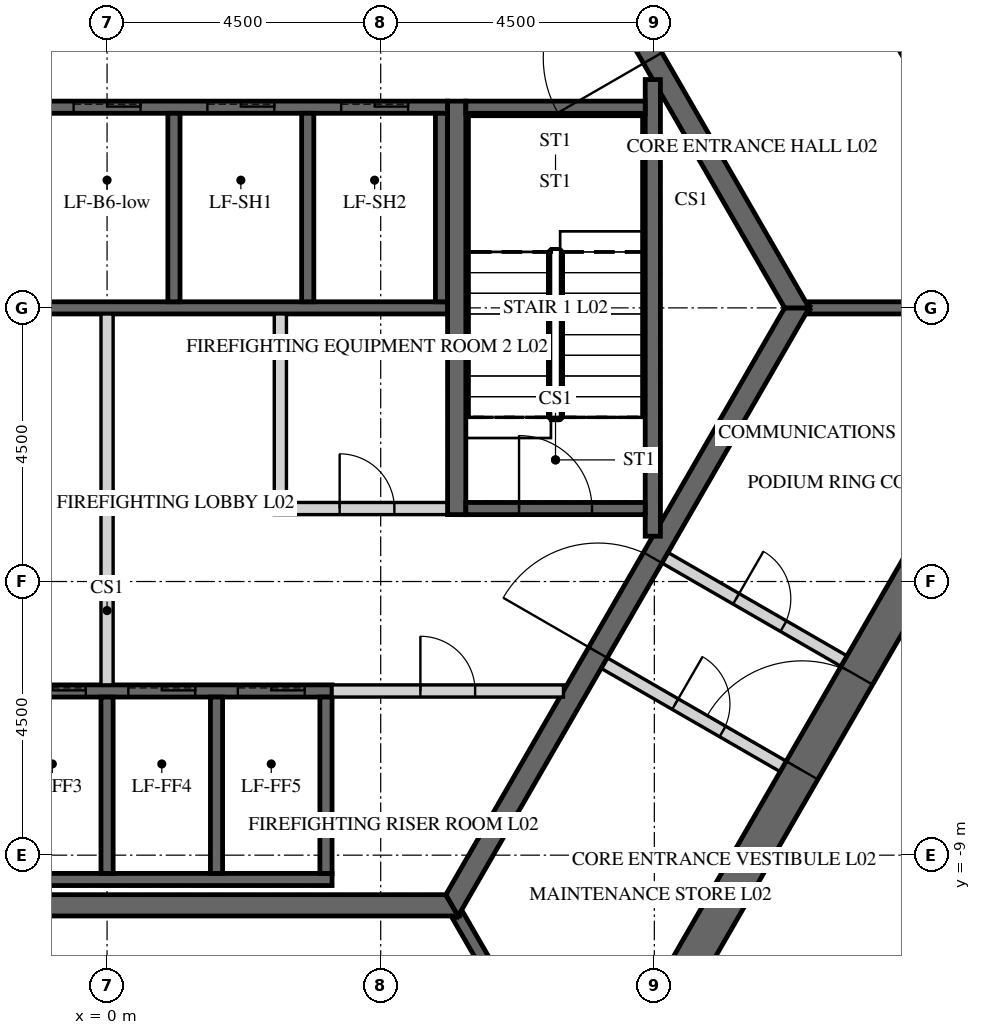
"""IFC4 building model, lengths in metres.
Left out: names, types, materials, properties, quantities, classifications, styles, units other than length and angle.
Written with IfcOpenShell. Run it as: python <this file> out.ifc"""

import sys

from ifc_helpers import new_model, si_unit, direction, frame, frame_2d, origin, place, context, subcontext, project, spatial, polyline, rectangle, outline, extrude, element, fill, save


model = new_model("IFC4")
c1 = context("Model", 3, precision=1e-05, world=origin(), true_north=direction((0.0, 1.0)))
c2 = subcontext(c1, "Body", "Model", "MODEL_VIEW")
j1 = project(units=[si_unit("LENGTHUNIT", "METRE"), si_unit("PLANEANGLEUNIT", "RADIAN")], contexts=[c1])
p1 = place(None, origin())
s1 = spatial("IfcSite", under=j1, at=p1, CompositionType="ELEMENT")
p2 = place(p1, origin())
s2 = spatial("IfcBuilding", under=s1, at=p2, CompositionType="ELEMENT")
p3 = place(p2, frame((0.0, 0.0, 15.0)))
s3 = spatial("IfcBuildingStorey", under=s2, at=p3, CompositionType="ELEMENT", Elevation=15.0)
p4 = place(p3, frame((7.91, -13.7, -0.25), z_axis=(0.0, 0.0, 1.0), x_axis=(0.499999880136, 0.866025472988, 0.0)))
e1 = element("IfcWall", 1, at=p4, inside=s3, PredefinedType="SHEAR", context=c2, shape_type="SweptSolid", body=[
    extrude(outline(polyline([(-0.173, -0.3), (15.993, -0.3), (15.646, 0.3), (0.173, 0.3), (-0.173, -0.3)])), origin(), (0.0, 0.0, 1.0), 5.5),
])
p5 = place(p4, frame((7.039, 0.0, 0.25)))
e2 = element("IfcOpeningElement", 2, at=p5, cuts=e1, PredefinedType="OPENING", context=c2, shape_type="SweptSolid", body=[
    extrude(rectangle(XDim=1.8, YDim=2.4, at=frame_2d((0.9, 1.2))), frame((0.0, 0.31, 0.0), z_axis=(0.0, -1.0, 0.0), x_axis=(1.0, 0.0, 0.0)), (0.0, 0.0, 1.0), 0.62),
])
p6 = place(p3, frame((15.819, 0.0, -0.25), z_axis=(0.0, 0.0, 1.0), x_axis=(-0.499999880136, 0.866025472988, 0.0)))
e3 = element("IfcWall", 3, at=p6, inside=s3, PredefinedType="SHEAR", context=c2, shape_type="SweptSolid", body=[
    extrude(outline(polyline([(-0.173, -0.3), (15.993, -0.3), (15.646, 0.3), (0.173, 0.3), (-0.173, -0.3)])), origin(), (0.0, 0.0, 1.0), 5.5),
])
p7 = place(p6, frame((6.981, 0.0, 0.25)))
e4 = element("IfcOpeningElement", 4, at=p7, cuts=e3, PredefinedType="OPENING", context=c2, shape_type="SweptSolid", body=[
    extrude(rectangle(XDim=1.8, YDim=2.4, at=frame_2d((0.9, 1.2))), frame((0.0, 0.31, 0.0), z_axis=(0.0, -1.0, 0.0), x_axis=(1.0, 0.0, 0.0)), (0.0, 0.0, 1.0), 0.62),
])
p8 = place(p3, frame((-5.673, -9.825, -0.25), z_axis=(0.0, 0.0, 1.0), x_axis=(1.0, 0.0, 0.0)))
e5 = element("IfcWall", 5, at=p8, inside=s3, PredefinedType="SHEAR", context=c2, shape_type="SweptSolid", body=[
    extrude(outline(polyline([(-0.101, -0.175), (11.446, -0.175), (11.244, 0.175), (0.101, 0.175), (-0.101, -0.175)])), origin(), (0.0, 0.0, 1.0), 5.5),
])
p9 = place(p3, frame((5.673, -9.825, -0.25), z_axis=(0.0, 0.0, 1.0), x_axis=(0.499995046907, 0.866028263435, 0.0)))
e6 = element("IfcWall", 6, at=p9, inside=s3, PredefinedType="SHEAR", context=c2, shape_type="SweptSolid", body=[
    extrude(outline(polyline([(-0.101, -0.175), (11.446, -0.175), (11.244, 0.175), (0.101, 0.175), (-0.101, -0.175)])), origin(), (0.0, 0.0, 1.0), 5.5),
])
p10 = place(p9, frame((4.801, 0.0, 0.25)))
e7 = element("IfcOpeningElement", 7, at=p10, cuts=e6, PredefinedType="OPENING", context=c2, shape_type="SweptSolid", body=[
    extrude(rectangle(XDim=1.8, YDim=2.4, at=frame_2d((0.9, 1.2))), frame((0.0, 0.185, 0.0), z_axis=(0.0, -1.0, 0.0), x_axis=(1.0, 0.0, 0.0)), (0.0, 0.0, 1.0), 0.37),
])
p11 = place(p3, frame((11.345, 0.0, -0.25), z_axis=(0.0, 0.0, 1.0), x_axis=(-0.499995046907, 0.866028263435, 0.0)))
e8 = element("IfcWall", 8, at=p11, inside=s3, PredefinedType="SHEAR", context=c2, shape_type="SweptSolid", body=[
    extrude(outline(polyline([(-0.101, -0.175), (11.446, -0.175), (11.244, 0.175), (0.101, 0.175), (-0.101, -0.175)])), origin(), (0.0, 0.0, 1.0), 5.5),
])
p12 = place(p11, frame((4.744, 0.0, 0.25)))
e9 = element("IfcOpeningElement", 9, at=p12, cuts=e8, PredefinedType="OPENING", context=c2, shape_type="SweptSolid", body=[
    extrude(rectangle(XDim=1.8, YDim=2.4, at=frame_2d((0.9, 1.2))), frame((0.0, 0.185, 0.0), z_axis=(0.0, -1.0, 0.0), x_axis=(1.0, 0.0, 0.0)), (0.0, 0.0, 1.0), 0.37),
])
p13 = place(p3, frame((-5.6, 3.3, -0.25), z_axis=(0.0, 0.0, 1.0), x_axis=(1.0, 0.0, 0.0)))
e10 = element("IfcWall", 10, at=p13, inside=s3, PredefinedType="SHEAR", context=c2, shape_type="SweptSolid", body=[
    extrude(rectangle(XDim=11.2, YDim=0.2, at=frame_2d((5.6, 0.0))), origin(), (0.0, 0.0, 1.0), 5.5),
])
p14 = place(p13, frame((0.65, 0.0, 0.25)))
e11 = element("IfcOpeningElement", 11, at=p14, cuts=e10, PredefinedType="OPENING", context=c2, shape_type="SweptSolid", body=[
    extrude(rectangle(XDim=1.1, YDim=2.1, at=frame_2d((0.55, 1.05))), frame((0.0, 0.11, 0.0), z_axis=(0.0, -1.0, 0.0), x_axis=(1.0, 0.0, 0.0)), (0.0, 0.0, 1.0), 0.22),
])
p15 = place(p13, frame((2.85, 0.0, 0.25)))
e12 = element("IfcOpeningElement", 12, at=p15, cuts=e10, PredefinedType="OPENING", context=c2, shape_type="SweptSolid", body=[
    extrude(rectangle(XDim=1.1, YDim=2.1, at=frame_2d((0.55, 1.05))), frame((0.0, 0.11, 0.0), z_axis=(0.0, -1.0, 0.0), x_axis=(1.0, 0.0, 0.0)), (0.0, 0.0, 1.0), 0.22),
])
p16 = place(p13, frame((5.05, 0.0, 0.25)))
e13 = element("IfcOpeningElement", 13, at=p16, cuts=e10, PredefinedType="OPENING", context=c2, shape_type="SweptSolid", body=[
    extrude(rectangle(XDim=1.1, YDim=2.1, at=frame_2d((0.55, 1.05))), frame((0.0, 0.11, 0.0), z_axis=(0.0, -1.0, 0.0), x_axis=(1.0, 0.0, 0.0)), (0.0, 0.0, 1.0), 0.22),
])
p17 = place(p13, frame((7.25, 0.0, 0.25)))
e14 = element("IfcOpeningElement", 14, at=p17, cuts=e10, PredefinedType="OPENING", context=c2, shape_type="SweptSolid", body=[
    extrude(rectangle(XDim=1.1, YDim=2.1, at=frame_2d((0.55, 1.05))), frame((0.0, 0.11, 0.0), z_axis=(0.0, -1.0, 0.0), x_axis=(1.0, 0.0, 0.0)), (0.0, 0.0, 1.0), 0.22),
])
p18 = place(p13, frame((9.45, 0.0, 0.25)))
e15 = element("IfcOpeningElement", 15, at=p18, cuts=e10, PredefinedType="OPENING", context=c2, shape_type="SweptSolid", body=[
    extrude(rectangle(XDim=1.1, YDim=2.1, at=frame_2d((0.55, 1.05))), frame((0.0, 0.11, 0.0), z_axis=(0.0, -1.0, 0.0), x_axis=(1.0, 0.0, 0.0)), (0.0, 0.0, 1.0), 0.22),
])
p19 = place(p3, frame((-5.6, 0.0, -0.25), z_axis=(0.0, 0.0, 1.0), x_axis=(1.0, 0.0, 0.0)))
e16 = element("IfcWall", 16, at=p19, inside=s3, PredefinedType="SHEAR", context=c2, shape_type="SweptSolid", body=[
    extrude(rectangle(XDim=11.2, YDim=0.2, at=frame_2d((5.6, 0.0))), origin(), (0.0, 0.0, 1.0), 5.5),
])
for number, where, z_axis, x_axis in (
    (17, (1.1, 0.1, -0.25), (0.0, 0.0, 1.0), (0.0, 1.0, 0.0)),
    (18, (3.3, 0.1, -0.25), (0.0, 0.0, 1.0), (0.0, 1.0, 0.0)),
    (19, (5.5, 0.1, -0.25), (0.0, 0.0, 1.0), (0.0, 1.0, 0.0)),
):
    element("IfcWall", number, at=place(p3, frame(where, z_axis=z_axis, x_axis=x_axis)), inside=s3, PredefinedType="SHEAR", context=c2, shape_type="SweptSolid", body=[
        extrude(rectangle(XDim=3.1, YDim=0.2, at=frame_2d((1.55, 0.0))), origin(), (0.0, 0.0, 1.0), 5.5),
    ])
p20 = place(p3, frame((-5.5, -6.3, -0.25), z_axis=(0.0, 0.0, 1.0), x_axis=(1.0, 0.0, 0.0)))
e20 = element("IfcWall", 20, at=p20, inside=s3, PredefinedType="SHEAR", context=c2, shape_type="SweptSolid", body=[
    extrude(rectangle(XDim=9.2, YDim=0.2, at=frame_2d((4.6, 0.0))), origin(), (0.0, 0.0, 1.0), 5.5),
])
p21 = place(p20, frame((0.45, 0.0, 0.25)))
e21 = element("IfcOpeningElement", 21, at=p21, cuts=e20, PredefinedType="OPENING", context=c2, shape_type="SweptSolid", body=[
    extrude(rectangle(XDim=1.1, YDim=2.1, at=frame_2d((0.55, 1.05))), frame((0.0, 0.11, 0.0), z_axis=(0.0, -1.0, 0.0), x_axis=(1.0, 0.0, 0.0)), (0.0, 0.0, 1.0), 0.22),
])
p22 = place(p20, frame((2.25, 0.0, 0.25)))
e22 = element("IfcOpeningElement", 22, at=p22, cuts=e20, PredefinedType="OPENING", context=c2, shape_type="SweptSolid", body=[
    extrude(rectangle(XDim=1.1, YDim=2.1, at=frame_2d((0.55, 1.05))), frame((0.0, 0.11, 0.0), z_axis=(0.0, -1.0, 0.0), x_axis=(1.0, 0.0, 0.0)), (0.0, 0.0, 1.0), 0.22),
])
p23 = place(p20, frame((4.05, 0.0, 0.25)))
e23 = element("IfcOpeningElement", 23, at=p23, cuts=e20, PredefinedType="OPENING", context=c2, shape_type="SweptSolid", body=[
    extrude(rectangle(XDim=1.1, YDim=2.1, at=frame_2d((0.55, 1.05))), frame((0.0, 0.11, 0.0), z_axis=(0.0, -1.0, 0.0), x_axis=(1.0, 0.0, 0.0)), (0.0, 0.0, 1.0), 0.22),
])
p24 = place(p20, frame((5.85, 0.0, 0.25)))
e24 = element("IfcOpeningElement", 24, at=p24, cuts=e20, PredefinedType="OPENING", context=c2, shape_type="SweptSolid", body=[
    extrude(rectangle(XDim=1.1, YDim=2.1, at=frame_2d((0.55, 1.05))), frame((0.0, 0.11, 0.0), z_axis=(0.0, -1.0, 0.0), x_axis=(1.0, 0.0, 0.0)), (0.0, 0.0, 1.0), 0.22),
])
p25 = place(p20, frame((7.65, 0.0, 0.25)))
e25 = element("IfcOpeningElement", 25, at=p25, cuts=e20, PredefinedType="OPENING", context=c2, shape_type="SweptSolid", body=[
    extrude(rectangle(XDim=1.1, YDim=2.1, at=frame_2d((0.55, 1.05))), frame((0.0, 0.11, 0.0), z_axis=(0.0, -1.0, 0.0), x_axis=(1.0, 0.0, 0.0)), (0.0, 0.0, 1.0), 0.22),
])
p26 = place(p3, frame((-5.5, -9.4, -0.25), z_axis=(0.0, 0.0, 1.0), x_axis=(1.0, 0.0, 0.0)))
e26 = element("IfcWall", 26, at=p26, inside=s3, PredefinedType="SHEAR", context=c2, shape_type="SweptSolid", body=[
    extrude(rectangle(XDim=9.2, YDim=0.2, at=frame_2d((4.6, 0.0))), origin(), (0.0, 0.0, 1.0), 5.5),
])
for number, where, z_axis, x_axis in (
    (27, (0.0, -9.3, -0.25), (0.0, 0.0, 1.0), (0.0, 1.0, 0.0)),
    (28, (1.8, -9.3, -0.25), (0.0, 0.0, 1.0), (0.0, 1.0, 0.0)),
    (29, (3.6, -9.3, -0.25), (0.0, 0.0, 1.0), (0.0, 1.0, 0.0)),
):
    element("IfcWall", number, at=place(p3, frame(where, z_axis=z_axis, x_axis=x_axis)), inside=s3, PredefinedType="SHEAR", context=c2, shape_type="SweptSolid", body=[
        extrude(rectangle(XDim=2.9, YDim=0.2, at=frame_2d((1.45, 0.0))), origin(), (0.0, 0.0, 1.0), 5.5),
    ])
p27 = place(p3, frame((2.75, -3.3, 0.0), z_axis=(0.0, 0.0, 1.0), x_axis=(1.0, 0.0, 0.0)))
e30 = element("IfcWall", 30, at=p27, inside=s3, PredefinedType="PARTITIONING", context=c2, shape_type="SweptSolid", body=[
    extrude(rectangle(XDim=2.85, YDim=0.2, at=frame_2d((1.425, 0.0))), origin(), (0.0, 0.0, 1.0), 5.25),
])
p28 = place(p27, frame((1.075, 0.0, 0.0)))
e31 = element("IfcOpeningElement", 31, at=p28, cuts=e30, PredefinedType="OPENING", context=c2, shape_type="SweptSolid", body=[
    extrude(rectangle(XDim=0.9, YDim=2.1, at=frame_2d((0.45, 1.05))), frame((0.0, 0.11, 0.0), z_axis=(0.0, -1.0, 0.0), x_axis=(1.0, 0.0, 0.0)), (0.0, 0.0, 1.0), 0.22),
])
p29 = place(p3, frame((2.85, -3.2, 0.0), z_axis=(0.0, 0.0, 1.0), x_axis=(0.0, 1.0, 0.0)))
e32 = element("IfcWall", 32, at=p29, inside=s3, PredefinedType="PARTITIONING", context=c2, shape_type="SweptSolid", body=[
    extrude(rectangle(XDim=3.1, YDim=0.2, at=frame_2d((1.55, 0.0))), origin(), (0.0, 0.0, 1.0), 5.25),
])
p30 = place(p3, frame((0.0, -6.2, 0.0), z_axis=(0.0, 0.0, 1.0), x_axis=(0.0, 1.0, 0.0)))
e33 = element("IfcWall", 33, at=p30, inside=s3, PredefinedType="PARTITIONING", context=c2, shape_type="SweptSolid", body=[
    extrude(rectangle(XDim=6.1, YDim=0.2, at=frame_2d((3.05, 0.0))), origin(), (0.0, 0.0, 1.0), 5.25),
])
p31 = place(p3, frame((3.7, -6.3, 0.0), z_axis=(0.0, 0.0, 1.0), x_axis=(1.0, 0.0, 0.0)))
e34 = element("IfcWall", 34, at=p31, inside=s3, PredefinedType="PARTITIONING", context=c2, shape_type="SweptSolid", body=[
    extrude(rectangle(XDim=3.806, YDim=0.2, at=frame_2d((1.903, 0.0))), origin(), (0.0, 0.0, 1.0), 5.25),
])
p32 = place(p31, frame((1.453, 0.0, 0.0)))
e35 = element("IfcOpeningElement", 35, at=p32, cuts=e34, PredefinedType="OPENING", context=c2, shape_type="SweptSolid", body=[
    extrude(rectangle(XDim=0.9, YDim=2.1, at=frame_2d((0.45, 1.05))), frame((0.0, 0.11, 0.0), z_axis=(0.0, -1.0, 0.0), x_axis=(1.0, 0.0, 0.0)), (0.0, 0.0, 1.0), 0.22),
])
p33 = place(p3, frame((11.547, 0.0, -0.25), z_axis=(0.0, 0.0, 1.0), x_axis=(1.0, 0.0, 0.0)))
e36 = element("IfcWall", 36, at=p33, inside=s3, PredefinedType="SHEAR", context=c2, shape_type="SweptSolid", body=[
    extrude(rectangle(XDim=3.926, YDim=0.2, at=frame_2d((1.963, 0.0))), origin(), (0.0, 0.0, 1.0), 5.5),
])
p34 = place(p3, frame((5.773, -10.0, -0.25), z_axis=(0.0, 0.0, 1.0), x_axis=(0.500038251005, -0.86600331843, 0.0)))
e37 = element("IfcWall", 37, at=p34, inside=s3, PredefinedType="SHEAR", context=c2, shape_type="SweptSolid", body=[
    extrude(rectangle(XDim=3.926, YDim=0.2, at=frame_2d((1.963, 0.0))), origin(), (0.0, 0.0, 1.0), 5.5),
])
p35 = place(p3, frame((9.175, -4.109, 0.0), z_axis=(0.0, 0.0, 1.0), x_axis=(0.865989465428, -0.500062241894, 0.0)))
e38 = element("IfcWall", 38, at=p35, inside=s3, PredefinedType="PARTITIONING", context=c2, shape_type="SweptSolid", body=[
    extrude(rectangle(XDim=3.4, YDim=0.2, at=frame_2d((1.7, 0.0))), origin(), (0.0, 0.0, 1.0), 5.25),
])
p36 = place(p35, frame((1.351, 0.0, 0.0)))
e39 = element("IfcOpeningElement", 39, at=p36, cuts=e38, PredefinedType="OPENING", context=c2, shape_type="SweptSolid", body=[
    extrude(rectangle(XDim=0.9, YDim=2.1, at=frame_2d((0.45, 1.05))), frame((0.0, 0.11, 0.0), z_axis=(0.0, -1.0, 0.0), x_axis=(1.0, 0.0, 0.0)), (0.0, 0.0, 1.0), 0.22),
])
p37 = place(p3, frame((8.175, -5.841, 0.0), z_axis=(0.0, 0.0, 1.0), x_axis=(0.866020560687, -0.500008388397, 0.0)))
e40 = element("IfcWall", 40, at=p37, inside=s3, PredefinedType="PARTITIONING", context=c2, shape_type="SweptSolid", body=[
    extrude(rectangle(XDim=3.4, YDim=0.2, at=frame_2d((1.7, 0.0))), origin(), (0.0, 0.0, 1.0), 5.25),
])
p38 = place(p37, frame((1.35, 0.0, 0.0)))
e41 = element("IfcOpeningElement", 41, at=p38, cuts=e40, PredefinedType="OPENING", context=c2, shape_type="SweptSolid", body=[
    extrude(rectangle(XDim=0.9, YDim=2.1, at=frame_2d((0.45, 1.05))), frame((0.0, 0.11, 0.0), z_axis=(0.0, -1.0, 0.0), x_axis=(1.0, 0.0, 0.0)), (0.0, 0.0, 1.0), 0.22),
])
p39 = place(p3, frame((5.75, -3.4, -0.25), z_axis=(0.0, 0.0, 1.0), x_axis=(0.0, 1.0, 0.0)))
e42 = element("IfcWall", 42, at=p39, inside=s3, PredefinedType="SHEAR", context=c2, shape_type="SweptSolid", body=[
    extrude(rectangle(XDim=6.8, YDim=0.3, at=frame_2d((3.4, 0.0))), origin(), (0.0, 0.0, 1.0), 5.5),
])
p40 = place(p3, frame((8.975, -3.755, -0.25), z_axis=(0.0, 0.0, 1.0), x_axis=(0.0, 1.0, 0.0)))
e43 = element("IfcWall", 43, at=p40, inside=s3, PredefinedType="SHEAR", context=c2, shape_type="SweptSolid", body=[
    extrude(rectangle(XDim=7.51, YDim=0.25, at=frame_2d((3.755, 0.0))), origin(), (0.0, 0.0, 1.0), 5.5),
])
p41 = place(p3, frame((5.9, 3.3, -0.25), z_axis=(0.0, 0.0, 1.0), x_axis=(1.0, 0.0, 0.0)))
e44 = element("IfcWall", 44, at=p41, inside=s3, PredefinedType="SHEAR", context=c2, shape_type="SweptSolid", body=[
    extrude(rectangle(XDim=2.95, YDim=0.2, at=frame_2d((1.475, 0.0))), origin(), (0.0, 0.0, 1.0), 5.5),
])
p42 = place(p3, frame((5.9, -3.3, -0.25), z_axis=(0.0, 0.0, 1.0), x_axis=(1.0, 0.0, 0.0)))
e45 = element("IfcWall", 45, at=p42, inside=s3, PredefinedType="SHEAR", context=c2, shape_type="SweptSolid", body=[
    extrude(rectangle(XDim=2.95, YDim=0.2, at=frame_2d((1.475, 0.0))), origin(), (0.0, 0.0, 1.0), 5.5),
])
p43 = place(p42, frame((0.875, 0.0, 0.25)))
e46 = element("IfcOpeningElement", 46, at=p43, cuts=e45, PredefinedType="OPENING", context=c2, shape_type="SweptSolid", body=[
    extrude(rectangle(XDim=1.2, YDim=2.4, at=frame_2d((0.6, 1.2))), frame((0.0, 0.11, 0.0), z_axis=(0.0, -1.0, 0.0), x_axis=(1.0, 0.0, 0.0)), (0.0, 0.0, 1.0), 0.22),
])
p44 = place(p5, origin())
e47 = element("IfcDoor", 47, at=p44, inside=s3, OperationType="DOUBLE_DOOR_SINGLE_SWING", PredefinedType="DOOR", context=c2, shape_type="SweptSolid", body=[
    extrude(rectangle(XDim=1.8, YDim=2.4, at=frame_2d((0.9, 1.2))), frame((0.0, 0.025, 0.0), z_axis=(0.0, -1.0, 0.0), x_axis=(1.0, 0.0, 0.0)), (0.0, 0.0, 1.0), 0.05),
])
fill(e2, e47)
p45 = place(p12, origin())
e48 = element("IfcDoor", 48, at=p45, inside=s3, OperationType="DOUBLE_DOOR_SINGLE_SWING", PredefinedType="DOOR", context=c2, shape_type="SweptSolid", body=[
    extrude(rectangle(XDim=1.8, YDim=2.4, at=frame_2d((0.9, 1.2))), frame((0.0, 0.025, 0.0), z_axis=(0.0, -1.0, 0.0), x_axis=(1.0, 0.0, 0.0)), (0.0, 0.0, 1.0), 0.05),
])
fill(e9, e48)
p46 = place(p10, origin())
e49 = element("IfcDoor", 49, at=p46, inside=s3, OperationType="DOUBLE_DOOR_SINGLE_SWING", PredefinedType="DOOR", context=c2, shape_type="SweptSolid", body=[
    extrude(rectangle(XDim=1.8, YDim=2.4, at=frame_2d((0.9, 1.2))), frame((0.0, 0.025, 0.0), z_axis=(0.0, -1.0, 0.0), x_axis=(1.0, 0.0, 0.0)), (0.0, 0.0, 1.0), 0.05),
])
fill(e7, e49)
p47 = place(p28, origin())
e50 = element("IfcDoor", 50, at=p47, inside=s3, OperationType="SINGLE_SWING_LEFT", PredefinedType="DOOR", context=c2, shape_type="SweptSolid", body=[
    extrude(rectangle(XDim=0.9, YDim=2.1, at=frame_2d((0.45, 1.05))), frame((0.0, 0.025, 0.0), z_axis=(0.0, -1.0, 0.0), x_axis=(1.0, 0.0, 0.0)), (0.0, 0.0, 1.0), 0.05),
])
fill(e31, e50)
p48 = place(p32, origin())
e51 = element("IfcDoor", 51, at=p48, inside=s3, OperationType="SINGLE_SWING_LEFT", PredefinedType="DOOR", context=c2, shape_type="SweptSolid", body=[
    extrude(rectangle(XDim=0.9, YDim=2.1, at=frame_2d((0.45, 1.05))), frame((0.0, 0.025, 0.0), z_axis=(0.0, -1.0, 0.0), x_axis=(1.0, 0.0, 0.0)), (0.0, 0.0, 1.0), 0.05),
])
fill(e35, e51)
p49 = place(p36, origin())
e52 = element("IfcDoor", 52, at=p49, inside=s3, OperationType="SINGLE_SWING_LEFT", PredefinedType="DOOR", context=c2, shape_type="SweptSolid", body=[
    extrude(rectangle(XDim=0.9, YDim=2.1, at=frame_2d((0.45, 1.05))), frame((0.0, 0.025, 0.0), z_axis=(0.0, -1.0, 0.0), x_axis=(1.0, 0.0, 0.0)), (0.0, 0.0, 1.0), 0.05),
])
fill(e39, e52)
p50 = place(p38, origin())
e53 = element("IfcDoor", 53, at=p50, inside=s3, OperationType="SINGLE_SWING_LEFT", PredefinedType="DOOR", context=c2, shape_type="SweptSolid", body=[
    extrude(rectangle(XDim=0.9, YDim=2.1, at=frame_2d((0.45, 1.05))), frame((0.0, 0.025, 0.0), z_axis=(0.0, -1.0, 0.0), x_axis=(1.0, 0.0, 0.0)), (0.0, 0.0, 1.0), 0.05),
])
fill(e41, e53)
p51 = place(p43, origin())
e54 = element("IfcDoor", 54, at=p51, inside=s3, OperationType="SINGLE_SWING_LEFT", PredefinedType="DOOR", context=c2, shape_type="SweptSolid", body=[
    extrude(rectangle(XDim=1.2, YDim=2.4, at=frame_2d((0.6, 1.2))), frame((0.0, 0.025, 0.0), z_axis=(0.0, -1.0, 0.0), x_axis=(1.0, 0.0, 0.0)), (0.0, 0.0, 1.0), 0.05),
])
fill(e46, e54)
p52 = place(p16, origin())
e55 = element("IfcDoor", 55, at=p52, inside=s3, OperationType="SLIDING_TO_LEFT", PredefinedType="DOOR", context=c2, shape_type="SweptSolid", body=[
    extrude(rectangle(XDim=1.1, YDim=2.1, at=frame_2d((0.55, 1.05))), frame((0.0, 0.025, 0.0), z_axis=(0.0, -1.0, 0.0), x_axis=(1.0, 0.0, 0.0)), (0.0, 0.0, 1.0), 0.05),
])
fill(e13, e55)
p53 = place(p17, origin())
e56 = element("IfcDoor", 56, at=p53, inside=s3, OperationType="SLIDING_TO_LEFT", PredefinedType="DOOR", context=c2, shape_type="SweptSolid", body=[
    extrude(rectangle(XDim=1.1, YDim=2.1, at=frame_2d((0.55, 1.05))), frame((0.0, 0.025, 0.0), z_axis=(0.0, -1.0, 0.0), x_axis=(1.0, 0.0, 0.0)), (0.0, 0.0, 1.0), 0.05),
])
fill(e14, e56)
p54 = place(p18, origin())
e57 = element("IfcDoor", 57, at=p54, inside=s3, OperationType="SLIDING_TO_LEFT", PredefinedType="DOOR", context=c2, shape_type="SweptSolid", body=[
    extrude(rectangle(XDim=1.1, YDim=2.1, at=frame_2d((0.55, 1.05))), frame((0.0, 0.025, 0.0), z_axis=(0.0, -1.0, 0.0), x_axis=(1.0, 0.0, 0.0)), (0.0, 0.0, 1.0), 0.05),
])
fill(e15, e57)
p55 = place(p23, origin())
e58 = element("IfcDoor", 58, at=p55, inside=s3, OperationType="SLIDING_TO_LEFT", PredefinedType="DOOR", context=c2, shape_type="SweptSolid", body=[
    extrude(rectangle(XDim=1.1, YDim=2.1, at=frame_2d((0.55, 1.05))), frame((0.0, 0.025, 0.0), z_axis=(0.0, -1.0, 0.0), x_axis=(1.0, 0.0, 0.0)), (0.0, 0.0, 1.0), 0.05),
])
fill(e23, e58)
p56 = place(p24, origin())
e59 = element("IfcDoor", 59, at=p56, inside=s3, OperationType="SLIDING_TO_LEFT", PredefinedType="DOOR", context=c2, shape_type="SweptSolid", body=[
    extrude(rectangle(XDim=1.1, YDim=2.1, at=frame_2d((0.55, 1.05))), frame((0.0, 0.025, 0.0), z_axis=(0.0, -1.0, 0.0), x_axis=(1.0, 0.0, 0.0)), (0.0, 0.0, 1.0), 0.05),
])
fill(e24, e59)
p57 = place(p25, origin())
e60 = element("IfcDoor", 60, at=p57, inside=s3, OperationType="SLIDING_TO_LEFT", PredefinedType="DOOR", context=c2, shape_type="SweptSolid", body=[
    extrude(rectangle(XDim=1.1, YDim=2.1, at=frame_2d((0.55, 1.05))), frame((0.0, 0.025, 0.0), z_axis=(0.0, -1.0, 0.0), x_axis=(1.0, 0.0, 0.0)), (0.0, 0.0, 1.0), 0.05),
])
fill(e25, e60)
save(model, sys.argv[1])
